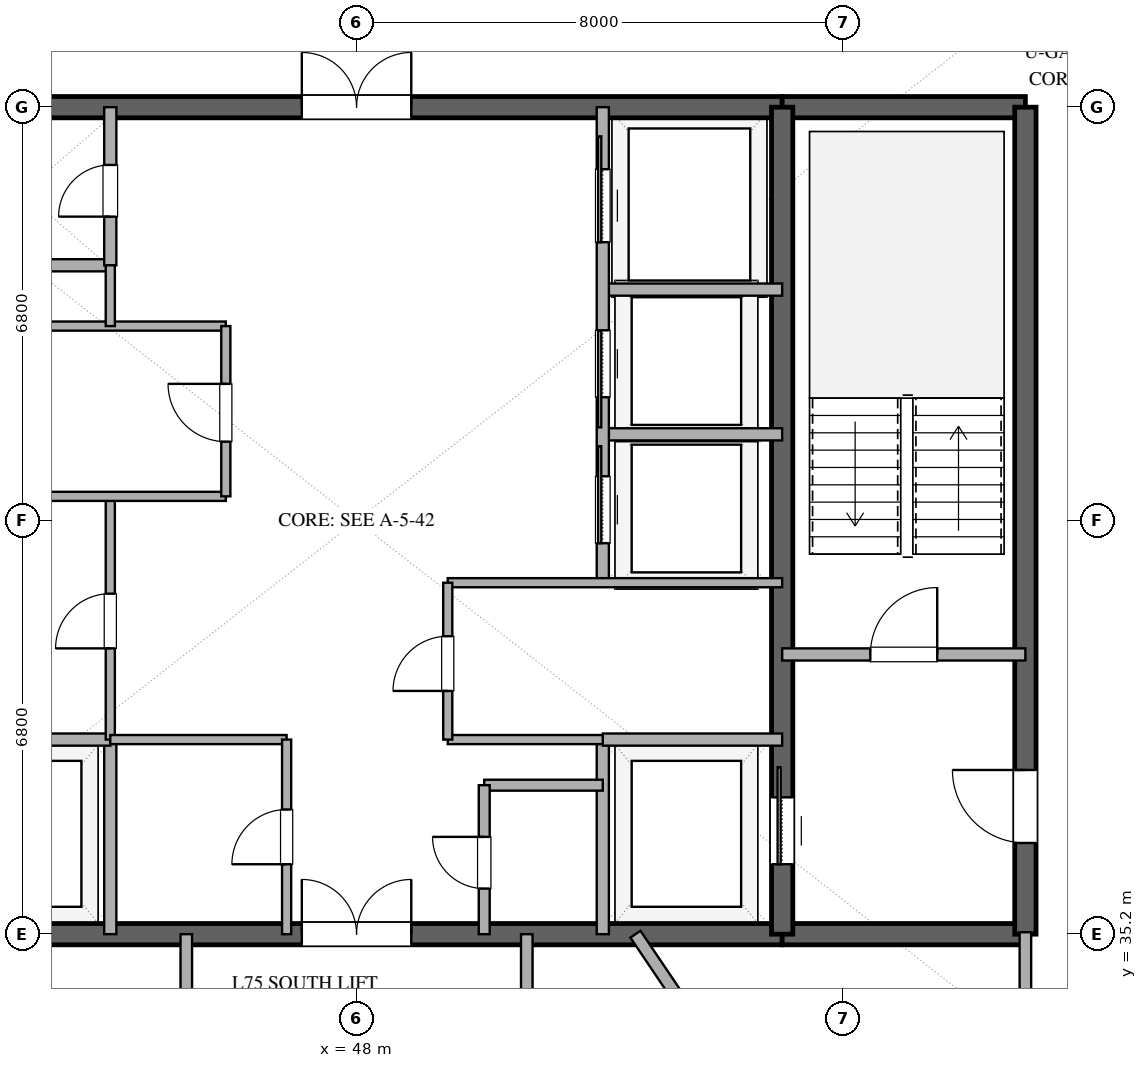
"""IFC4 building model, lengths in metres.
Left out: names, types, materials, properties, quantities, classifications, styles, units other than length and angle.
Written with IfcOpenShell. Run it as: python <this file> out.ifc"""

import sys

from ifc_helpers import new_model, si_unit, direction, frame, frame_2d, origin, place, context, subcontext, project, spatial, rectangle, extrude, element, fill, save


model = new_model("IFC4")
c1 = context("Model", 3, precision=1e-05, world=origin(), true_north=direction((0.0, 1.0)))
c2 = subcontext(c1, "Body", "Model", "MODEL_VIEW")
j1 = project(units=[si_unit("LENGTHUNIT", "METRE"), si_unit("PLANEANGLEUNIT", "RADIAN")], contexts=[c1])
p1 = place(None, origin())
s1 = spatial("IfcSite", under=j1, at=p1, CompositionType="ELEMENT")
p2 = place(p1, origin())
s2 = spatial("IfcBuilding", under=s1, at=p2, CompositionType="ELEMENT")
p3 = place(p2, frame((0.0, 0.0, 291.0)))
s3 = spatial("IfcBuildingStorey", under=s2, at=p3, CompositionType="ELEMENT", Elevation=291.0)
p4 = place(p3, frame((41.0, 35.2, 0.0), z_axis=(0.0, 0.0, 1.0), x_axis=(1.0, 0.0, 0.0)))
e1 = element("IfcWall", 1, at=p4, inside=s3, PredefinedType="SHEAR", context=c2, shape_type="SweptSolid", body=[
    extrude(rectangle(XDim=14.0, YDim=0.35, at=frame_2d((7.0, 0.0))), origin(), (0.0, 0.0, 1.0), 3.37),
])
p5 = place(p4, frame((6.1, 0.0, 0.0)))
e2 = element("IfcOpeningElement", 2, at=p5, cuts=e1, PredefinedType="OPENING", context=c2, shape_type="SweptSolid", body=[
    extrude(rectangle(XDim=1.8, YDim=2.25, at=frame_2d((0.9, 1.125))), frame((0.0, 0.185, 0.0), z_axis=(0.0, -1.0, 0.0), x_axis=(1.0, 0.0, 0.0)), (0.0, 0.0, 1.0), 0.37),
])
p6 = place(p3, frame((55.0, 35.2, 0.0), z_axis=(0.0, 0.0, 1.0), x_axis=(1.0, 0.0, 0.0)))
e3 = element("IfcWall", 3, at=p6, inside=s3, PredefinedType="SHEAR", context=c2, shape_type="SweptSolid", body=[
    extrude(rectangle(XDim=4.0, YDim=0.35, at=frame_2d((2.0, 0.0))), origin(), (0.0, 0.0, 1.0), 3.37),
])
p7 = place(p3, frame((41.0, 48.8, 0.0), z_axis=(0.0, 0.0, 1.0), x_axis=(1.0, 0.0, 0.0)))
e4 = element("IfcWall", 4, at=p7, inside=s3, PredefinedType="SHEAR", context=c2, shape_type="SweptSolid", body=[
    extrude(rectangle(XDim=14.0, YDim=0.35, at=frame_2d((7.0, 0.0))), origin(), (0.0, 0.0, 1.0), 3.37),
])
p8 = place(p7, frame((6.1, 0.0, 0.0)))
e5 = element("IfcOpeningElement", 5, at=p8, cuts=e4, PredefinedType="OPENING", context=c2, shape_type="SweptSolid", body=[
    extrude(rectangle(XDim=1.8, YDim=2.25, at=frame_2d((0.9, 1.125))), frame((0.0, 0.185, 0.0), z_axis=(0.0, -1.0, 0.0), x_axis=(1.0, 0.0, 0.0)), (0.0, 0.0, 1.0), 0.37),
])
p9 = place(p3, frame((55.0, 48.8, 0.0), z_axis=(0.0, 0.0, 1.0), x_axis=(1.0, 0.0, 0.0)))
e6 = element("IfcWall", 6, at=p9, inside=s3, PredefinedType="SHEAR", context=c2, shape_type="SweptSolid", body=[
    extrude(rectangle(XDim=4.0, YDim=0.35, at=frame_2d((2.0, 0.0))), origin(), (0.0, 0.0, 1.0), 3.37),
])
p10 = place(p3, frame((59.0, 35.2, 0.0), z_axis=(0.0, 0.0, 1.0), x_axis=(0.0, 1.0, 0.0)))
e7 = element("IfcWall", 7, at=p10, inside=s3, PredefinedType="SHEAR", context=c2, shape_type="SweptSolid", body=[
    extrude(rectangle(XDim=13.6, YDim=0.35, at=frame_2d((6.8, 0.0))), origin(), (0.0, 0.0, 1.0), 3.37),
])
p11 = place(p10, frame((1.5, 0.0, 0.0)))
e8 = element("IfcOpeningElement", 8, at=p11, cuts=e7, PredefinedType="OPENING", context=c2, shape_type="SweptSolid", body=[
    extrude(rectangle(XDim=1.2, YDim=2.15, at=frame_2d((0.6, 1.075))), frame((0.0, 0.185, 0.0), z_axis=(0.0, -1.0, 0.0), x_axis=(1.0, 0.0, 0.0)), (0.0, 0.0, 1.0), 0.37),
])
p12 = place(p3, frame((55.0, 35.2, 0.0), z_axis=(0.0, 0.0, 1.0), x_axis=(0.0, 1.0, 0.0)))
e9 = element("IfcWall", 9, at=p12, inside=s3, PredefinedType="SHEAR", context=c2, shape_type="SweptSolid", body=[
    extrude(rectangle(XDim=13.6, YDim=0.35, at=frame_2d((6.8, 0.0))), origin(), (0.0, 0.0, 1.0), 3.37),
])
p13 = place(p12, frame((1.15, 0.0, 0.0)))
e10 = element("IfcOpeningElement", 10, at=p13, cuts=e9, PredefinedType="OPENING", context=c2, shape_type="SweptSolid", body=[
    extrude(rectangle(XDim=1.1, YDim=2.2, at=frame_2d((0.55, 1.1))), frame((0.0, 0.185, 0.0), z_axis=(0.0, -1.0, 0.0), x_axis=(1.0, 0.0, 0.0)), (0.0, 0.0, 1.0), 0.37),
])
p14 = place(p3, frame((55.0, 39.8, 0.0), z_axis=(0.0, 0.0, 1.0), x_axis=(1.0, 0.0, 0.0)))
e11 = element("IfcWall", 11, at=p14, inside=s3, PredefinedType="SOLIDWALL", context=c2, shape_type="SweptSolid", body=[
    extrude(rectangle(XDim=4.0, YDim=0.2, at=frame_2d((2.0, 0.0))), origin(), (0.0, 0.0, 1.0), 2.73),
])
p15 = place(p14, frame((1.45, 0.0, 0.0)))
e12 = element("IfcOpeningElement", 12, at=p15, cuts=e11, PredefinedType="OPENING", context=c2, shape_type="SweptSolid", body=[
    extrude(rectangle(XDim=1.1, YDim=2.15, at=frame_2d((0.55, 1.075))), frame((0.0, 0.11, 0.0), z_axis=(0.0, -1.0, 0.0), x_axis=(1.0, 0.0, 0.0)), (0.0, 0.0, 1.0), 0.22),
])
p16 = place(p3, frame((43.95, 35.2, 0.0), z_axis=(0.0, 0.0, 1.0), x_axis=(0.0, 1.0, 0.0)))
e13 = element("IfcWall", 13, at=p16, inside=s3, PredefinedType="SOLIDWALL", context=c2, shape_type="SweptSolid", body=[
    extrude(rectangle(XDim=3.2, YDim=0.2, at=frame_2d((1.6, 0.0))), origin(), (0.0, 0.0, 1.0), 2.73),
])
p17 = place(p3, frame((41.0, 38.4, 0.0), z_axis=(0.0, 0.0, 1.0), x_axis=(1.0, 0.0, 0.0)))
e14 = element("IfcWall", 14, at=p17, inside=s3, PredefinedType="SOLIDWALL", context=c2, shape_type="SweptSolid", body=[
    extrude(rectangle(XDim=2.95, YDim=0.2, at=frame_2d((1.475, 0.0))), origin(), (0.0, 0.0, 1.0), 2.73),
])
p18 = place(p3, frame((52.05, 35.2, 0.0), z_axis=(0.0, 0.0, 1.0), x_axis=(0.0, 1.0, 0.0)))
e15 = element("IfcWall", 15, at=p18, inside=s3, PredefinedType="SOLIDWALL", context=c2, shape_type="SweptSolid", body=[
    extrude(rectangle(XDim=3.2, YDim=0.2, at=frame_2d((1.6, 0.0))), origin(), (0.0, 0.0, 1.0), 2.73),
])
for number, where, z_axis, x_axis in (
    (16, (52.05, 38.4, 0.0), (0.0, 0.0, 1.0), (1.0, 0.0, 0.0)),
    (17, (41.0, 46.2, 0.0), (0.0, 0.0, 1.0), (1.0, 0.0, 0.0)),
):
    element("IfcWall", number, at=place(p3, frame(where, z_axis=z_axis, x_axis=x_axis)), inside=s3, PredefinedType="SOLIDWALL", context=c2, shape_type="SweptSolid", body=[
        extrude(rectangle(XDim=2.95, YDim=0.2, at=frame_2d((1.475, 0.0))), origin(), (0.0, 0.0, 1.0), 2.73),
    ])
p19 = place(p3, frame((43.95, 46.2, 0.0), z_axis=(0.0, 0.0, 1.0), x_axis=(0.0, 1.0, 0.0)))
e18 = element("IfcWall", 18, at=p19, inside=s3, PredefinedType="SOLIDWALL", context=c2, shape_type="SweptSolid", body=[
    extrude(rectangle(XDim=2.6, YDim=0.2, at=frame_2d((1.3, 0.0))), origin(), (0.0, 0.0, 1.0), 2.73),
])
p20 = place(p19, frame((0.8, 0.0, 0.0)))
e19 = element("IfcOpeningElement", 19, at=p20, cuts=e18, PredefinedType="OPENING", context=c2, shape_type="SweptSolid", body=[
    extrude(rectangle(XDim=0.85, YDim=2.15, at=frame_2d((0.425, 1.075))), frame((0.0, 0.11, 0.0), z_axis=(0.0, -1.0, 0.0), x_axis=(1.0, 0.0, 0.0)), (0.0, 0.0, 1.0), 0.22),
])
p21 = place(p3, frame((43.95, 38.4, 0.0), z_axis=(0.0, 0.0, 1.0), x_axis=(0.0, 1.0, 0.0)))
e20 = element("IfcWall", 20, at=p21, inside=s3, PredefinedType="PARTITIONING", context=c2, shape_type="SweptSolid", body=[
    extrude(rectangle(XDim=4.0, YDim=0.15, at=frame_2d((2.0, 0.0))), origin(), (0.0, 0.0, 1.0), 2.73),
])
p22 = place(p21, frame((1.5, 0.0, 0.0)))
e21 = element("IfcOpeningElement", 21, at=p22, cuts=e20, PredefinedType="OPENING", context=c2, shape_type="SweptSolid", body=[
    extrude(rectangle(XDim=0.9, YDim=2.15, at=frame_2d((0.45, 1.075))), frame((0.0, 0.085, 0.0), z_axis=(0.0, -1.0, 0.0), x_axis=(1.0, 0.0, 0.0)), (0.0, 0.0, 1.0), 0.17),
])
for number, where, z_axis, x_axis in (
    (22, (41.0, 42.4, 0.0), (0.0, 0.0, 1.0), (1.0, 0.0, 0.0)),
    (23, (41.0, 45.2, 0.0), (0.0, 0.0, 1.0), (1.0, 0.0, 0.0)),
):
    element("IfcWall", number, at=place(p3, frame(where, z_axis=z_axis, x_axis=x_axis)), inside=s3, PredefinedType="PARTITIONING", context=c2, shape_type="SweptSolid", body=[
        extrude(rectangle(XDim=4.85, YDim=0.15, at=frame_2d((2.425, 0.0))), origin(), (0.0, 0.0, 1.0), 2.73),
    ])
p23 = place(p3, frame((43.95, 45.2, 0.0), z_axis=(0.0, 0.0, 1.0), x_axis=(0.0, 1.0, 0.0)))
e24 = element("IfcWall", 24, at=p23, inside=s3, PredefinedType="PARTITIONING", context=c2, shape_type="SweptSolid", body=[
    extrude(rectangle(XDim=1.0, YDim=0.15, at=frame_2d((0.5, 0.0))), origin(), (0.0, 0.0, 1.0), 2.73),
])
p24 = place(p3, frame((45.85, 42.4, 0.0), z_axis=(0.0, 0.0, 1.0), x_axis=(0.0, 1.0, 0.0)))
e25 = element("IfcWall", 25, at=p24, inside=s3, PredefinedType="PARTITIONING", context=c2, shape_type="SweptSolid", body=[
    extrude(rectangle(XDim=2.8, YDim=0.15, at=frame_2d((1.4, 0.0))), origin(), (0.0, 0.0, 1.0), 2.73),
])
p25 = place(p24, frame((0.9, 0.0, 0.0)))
e26 = element("IfcOpeningElement", 26, at=p25, cuts=e25, PredefinedType="OPENING", context=c2, shape_type="SweptSolid", body=[
    extrude(rectangle(XDim=0.95, YDim=2.15, at=frame_2d((0.475, 1.075))), frame((0.0, 0.085, 0.0), z_axis=(0.0, -1.0, 0.0), x_axis=(1.0, 0.0, 0.0)), (0.0, 0.0, 1.0), 0.17),
])
for number, where, z_axis, x_axis in (
    (27, (52.05, 43.42, 0.0), (0.0, 0.0, 1.0), (1.0, 0.0, 0.0)),
    (28, (52.05, 45.8, 0.0), (0.0, 0.0, 1.0), (1.0, 0.0, 0.0)),
):
    element("IfcWall", number, at=place(p3, frame(where, z_axis=z_axis, x_axis=x_axis)), inside=s3, PredefinedType="SOLIDWALL", context=c2, shape_type="SweptSolid", body=[
        extrude(rectangle(XDim=2.95, YDim=0.2, at=frame_2d((1.475, 0.0))), origin(), (0.0, 0.0, 1.0), 2.73),
    ])
p26 = place(p3, frame((52.05, 40.98, 0.0), z_axis=(0.0, 0.0, 1.0), x_axis=(0.0, 1.0, 0.0)))
e29 = element("IfcWall", 29, at=p26, inside=s3, PredefinedType="SOLIDWALL", context=c2, shape_type="SweptSolid", body=[
    extrude(rectangle(XDim=7.82, YDim=0.2, at=frame_2d((3.91, 0.0))), origin(), (0.0, 0.0, 1.0), 2.73),
])
p27 = place(p26, frame((0.65, 0.0, 0.0)))
e30 = element("IfcOpeningElement", 30, at=p27, cuts=e29, PredefinedType="OPENING", context=c2, shape_type="SweptSolid", body=[
    extrude(rectangle(XDim=1.1, YDim=2.2, at=frame_2d((0.55, 1.1))), frame((0.0, 0.11, 0.0), z_axis=(0.0, -1.0, 0.0), x_axis=(1.0, 0.0, 0.0)), (0.0, 0.0, 1.0), 0.22),
])
p28 = place(p26, frame((3.05, 0.0, 0.0)))
e31 = element("IfcOpeningElement", 31, at=p28, cuts=e29, PredefinedType="OPENING", context=c2, shape_type="SweptSolid", body=[
    extrude(rectangle(XDim=1.1, YDim=2.2, at=frame_2d((0.55, 1.1))), frame((0.0, 0.11, 0.0), z_axis=(0.0, -1.0, 0.0), x_axis=(1.0, 0.0, 0.0)), (0.0, 0.0, 1.0), 0.22),
])
p29 = place(p26, frame((5.6, 0.0, 0.0)))
e32 = element("IfcOpeningElement", 32, at=p29, cuts=e29, PredefinedType="OPENING", context=c2, shape_type="SweptSolid", body=[
    extrude(rectangle(XDim=1.2, YDim=2.2, at=frame_2d((0.6, 1.1))), frame((0.0, 0.11, 0.0), z_axis=(0.0, -1.0, 0.0), x_axis=(1.0, 0.0, 0.0)), (0.0, 0.0, 1.0), 0.22),
])
p30 = place(p3, frame((49.5, 40.98, 0.0), z_axis=(0.0, 0.0, 1.0), x_axis=(1.0, 0.0, 0.0)))
e33 = element("IfcWall", 33, at=p30, inside=s3, PredefinedType="PARTITIONING", context=c2, shape_type="SweptSolid", body=[
    extrude(rectangle(XDim=5.5, YDim=0.15, at=frame_2d((2.75, 0.0))), origin(), (0.0, 0.0, 1.0), 2.73),
])
p31 = place(p3, frame((49.5, 38.4, 0.0), z_axis=(0.0, 0.0, 1.0), x_axis=(1.0, 0.0, 0.0)))
e34 = element("IfcWall", 34, at=p31, inside=s3, PredefinedType="PARTITIONING", context=c2, shape_type="SweptSolid", body=[
    extrude(rectangle(XDim=2.55, YDim=0.15, at=frame_2d((1.275, 0.0))), origin(), (0.0, 0.0, 1.0), 2.73),
])
p32 = place(p3, frame((49.5, 38.4, 0.0), z_axis=(0.0, 0.0, 1.0), x_axis=(0.0, 1.0, 0.0)))
e35 = element("IfcWall", 35, at=p32, inside=s3, PredefinedType="PARTITIONING", context=c2, shape_type="SweptSolid", body=[
    extrude(rectangle(XDim=2.58, YDim=0.15, at=frame_2d((1.29, 0.0))), origin(), (0.0, 0.0, 1.0), 2.73),
])
p33 = place(p32, frame((0.8, 0.0, 0.0)))
e36 = element("IfcOpeningElement", 36, at=p33, cuts=e35, PredefinedType="OPENING", context=c2, shape_type="SweptSolid", body=[
    extrude(rectangle(XDim=0.9, YDim=2.15, at=frame_2d((0.45, 1.075))), frame((0.0, 0.085, 0.0), z_axis=(0.0, -1.0, 0.0), x_axis=(1.0, 0.0, 0.0)), (0.0, 0.0, 1.0), 0.17),
])
p34 = place(p3, frame((43.95, 38.4, 0.0), z_axis=(0.0, 0.0, 1.0), x_axis=(1.0, 0.0, 0.0)))
e37 = element("IfcWall", 37, at=p34, inside=s3, PredefinedType="PARTITIONING", context=c2, shape_type="SweptSolid", body=[
    extrude(rectangle(XDim=2.9, YDim=0.15, at=frame_2d((1.45, 0.0))), origin(), (0.0, 0.0, 1.0), 2.73),
])
p35 = place(p3, frame((46.85, 35.2, 0.0), z_axis=(0.0, 0.0, 1.0), x_axis=(0.0, 1.0, 0.0)))
e38 = element("IfcWall", 38, at=p35, inside=s3, PredefinedType="PARTITIONING", context=c2, shape_type="SweptSolid", body=[
    extrude(rectangle(XDim=3.2, YDim=0.15, at=frame_2d((1.6, 0.0))), origin(), (0.0, 0.0, 1.0), 2.73),
])
p36 = place(p35, frame((1.15, 0.0, 0.0)))
e39 = element("IfcOpeningElement", 39, at=p36, cuts=e38, PredefinedType="OPENING", context=c2, shape_type="SweptSolid", body=[
    extrude(rectangle(XDim=0.9, YDim=2.15, at=frame_2d((0.45, 1.075))), frame((0.0, 0.085, 0.0), z_axis=(0.0, -1.0, 0.0), x_axis=(1.0, 0.0, 0.0)), (0.0, 0.0, 1.0), 0.17),
])
p37 = place(p3, frame((50.1, 37.65, 0.0), z_axis=(0.0, 0.0, 1.0), x_axis=(1.0, 0.0, 0.0)))
e40 = element("IfcWall", 40, at=p37, inside=s3, PredefinedType="PLUMBINGWALL", context=c2, shape_type="SweptSolid", body=[
    extrude(rectangle(XDim=1.95, YDim=0.18, at=frame_2d((0.975, 0.0))), origin(), (0.0, 0.0, 1.0), 2.73),
])
p38 = place(p3, frame((50.1, 35.2, 0.0), z_axis=(0.0, 0.0, 1.0), x_axis=(0.0, 1.0, 0.0)))
e41 = element("IfcWall", 41, at=p38, inside=s3, PredefinedType="PLUMBINGWALL", context=c2, shape_type="SweptSolid", body=[
    extrude(rectangle(XDim=2.45, YDim=0.18, at=frame_2d((1.225, 0.0))), origin(), (0.0, 0.0, 1.0), 2.73),
])
p39 = place(p38, frame((0.75, 0.0, 0.0)))
e42 = element("IfcOpeningElement", 42, at=p39, cuts=e41, PredefinedType="OPENING", context=c2, shape_type="SweptSolid", body=[
    extrude(rectangle(XDim=0.85, YDim=2.1, at=frame_2d((0.425, 1.05))), frame((0.0, 0.1, 0.0), z_axis=(0.0, -1.0, 0.0), x_axis=(1.0, 0.0, 0.0)), (0.0, 0.0, 1.0), 0.2),
])
p40 = place(p3, frame((54.97, 31.667, 0.0), z_axis=(0.0, 0.0, 1.0), x_axis=(-0.559200276542, 0.829032599308, 0.0)))
e43 = element("IfcWall", 43, at=p40, inside=s3, PredefinedType="PARTITIONING", context=c2, shape_type="SweptSolid", body=[
    extrude(rectangle(XDim=4.261, YDim=0.2, at=frame_2d((2.131, 0.0))), origin(), (0.0, 0.0, 1.0), 2.73),
])
for number, where, z_axis, x_axis in (
    (44, (50.8, 35.2, 0.0), (0.0, 0.0, 1.0), (0.0, -1.0, 0.0)),
    (45, (45.2, 33.1, 0.0), (0.0, 0.0, 1.0), (0.0, 1.0, 0.0)),
):
    element("IfcWall", number, at=place(p3, frame(where, z_axis=z_axis, x_axis=x_axis)), inside=s3, PredefinedType="PARTITIONING", context=c2, shape_type="SweptSolid", body=[
        extrude(rectangle(XDim=2.1, YDim=0.19, at=frame_2d((1.05, 0.0))), origin(), (0.0, 0.0, 1.0), 2.73),
    ])
p41 = place(p3, frame((59.0, 34.0, 0.0), z_axis=(0.0, 0.0, 1.0), x_axis=(0.0, 1.0, 0.0)))
e46 = element("IfcWall", 46, at=p41, inside=s3, PredefinedType="PARTITIONING", context=c2, shape_type="SweptSolid", body=[
    extrude(rectangle(XDim=1.232, YDim=0.19, at=frame_2d((0.616, 0.0))), origin(), (0.0, 0.0, 1.0), 2.73),
])
p42 = place(p13, origin())
e47 = element("IfcDoor", 47, at=p42, inside=s3, OperationType="SLIDING_TO_RIGHT", PredefinedType="DOOR", context=c2, shape_type="SweptSolid", body=[
    extrude(rectangle(XDim=1.1, YDim=2.2, at=frame_2d((0.55, 1.1))), frame((0.0, 0.025, 0.0), z_axis=(0.0, -1.0, 0.0), x_axis=(1.0, 0.0, 0.0)), (0.0, 0.0, 1.0), 0.05),
])
fill(e10, e47)
p43 = place(p11, origin())
e48 = element("IfcDoor", 48, at=p43, inside=s3, OperationType="SINGLE_SWING_RIGHT", PredefinedType="DOOR", context=c2, shape_type="SweptSolid", body=[
    extrude(rectangle(XDim=1.2, YDim=2.15, at=frame_2d((0.6, 1.075))), frame((0.0, 0.025, 0.0), z_axis=(0.0, -1.0, 0.0), x_axis=(1.0, 0.0, 0.0)), (0.0, 0.0, 1.0), 0.05),
])
fill(e8, e48)
p44 = place(p5, origin())
e49 = element("IfcDoor", 49, at=p44, inside=s3, OperationType="DOUBLE_DOOR_SINGLE_SWING", PredefinedType="DOOR", context=c2, shape_type="SweptSolid", body=[
    extrude(rectangle(XDim=1.8, YDim=2.25, at=frame_2d((0.9, 1.125))), frame((0.0, 0.025, 0.0), z_axis=(0.0, -1.0, 0.0), x_axis=(1.0, 0.0, 0.0)), (0.0, 0.0, 1.0), 0.05),
])
fill(e2, e49)
p45 = place(p8, origin())
e50 = element("IfcDoor", 50, at=p45, inside=s3, OperationType="DOUBLE_DOOR_SINGLE_SWING", PredefinedType="DOOR", context=c2, shape_type="SweptSolid", body=[
    extrude(rectangle(XDim=1.8, YDim=2.25, at=frame_2d((0.9, 1.125))), frame((0.0, 0.025, 0.0), z_axis=(0.0, -1.0, 0.0), x_axis=(1.0, 0.0, 0.0)), (0.0, 0.0, 1.0), 0.05),
])
fill(e5, e50)
p46 = place(p15, origin())
e51 = element("IfcDoor", 51, at=p46, inside=s3, OperationType="SINGLE_SWING_RIGHT", PredefinedType="DOOR", context=c2, shape_type="SweptSolid", body=[
    extrude(rectangle(XDim=1.1, YDim=2.15, at=frame_2d((0.55, 1.075))), frame((0.0, 0.025, 0.0), z_axis=(0.0, -1.0, 0.0), x_axis=(1.0, 0.0, 0.0)), (0.0, 0.0, 1.0), 0.05),
])
fill(e12, e51)
p47 = place(p20, origin())
e52 = element("IfcDoor", 52, at=p47, inside=s3, OperationType="SINGLE_SWING_LEFT", PredefinedType="DOOR", context=c2, shape_type="SweptSolid", body=[
    extrude(rectangle(XDim=0.85, YDim=2.15, at=frame_2d((0.425, 1.075))), frame((0.0, 0.025, 0.0), z_axis=(0.0, -1.0, 0.0), x_axis=(1.0, 0.0, 0.0)), (0.0, 0.0, 1.0), 0.05),
])
fill(e19, e52)
p48 = place(p22, origin())
e53 = element("IfcDoor", 53, at=p48, inside=s3, OperationType="SINGLE_SWING_LEFT", PredefinedType="DOOR", context=c2, shape_type="SweptSolid", body=[
    extrude(rectangle(XDim=0.9, YDim=2.15, at=frame_2d((0.45, 1.075))), frame((0.0, 0.025, 0.0), z_axis=(0.0, -1.0, 0.0), x_axis=(1.0, 0.0, 0.0)), (0.0, 0.0, 1.0), 0.05),
])
fill(e21, e53)
p49 = place(p25, origin())
e54 = element("IfcDoor", 54, at=p49, inside=s3, OperationType="SINGLE_SWING_RIGHT", PredefinedType="DOOR", context=c2, shape_type="SweptSolid", body=[
    extrude(rectangle(XDim=0.95, YDim=2.15, at=frame_2d((0.475, 1.075))), frame((0.0, 0.025, 0.0), z_axis=(0.0, -1.0, 0.0), x_axis=(1.0, 0.0, 0.0)), (0.0, 0.0, 1.0), 0.05),
])
fill(e26, e54)
p50 = place(p27, origin())
e55 = element("IfcDoor", 55, at=p50, inside=s3, OperationType="SLIDING_TO_RIGHT", PredefinedType="DOOR", context=c2, shape_type="SweptSolid", body=[
    extrude(rectangle(XDim=1.1, YDim=2.2, at=frame_2d((0.55, 1.1))), frame((0.0, 0.025, 0.0), z_axis=(0.0, -1.0, 0.0), x_axis=(1.0, 0.0, 0.0)), (0.0, 0.0, 1.0), 0.05),
])
fill(e30, e55)
p51 = place(p28, origin())
e56 = element("IfcDoor", 56, at=p51, inside=s3, OperationType="SLIDING_TO_LEFT", PredefinedType="DOOR", context=c2, shape_type="SweptSolid", body=[
    extrude(rectangle(XDim=1.1, YDim=2.2, at=frame_2d((0.55, 1.1))), frame((0.0, 0.025, 0.0), z_axis=(0.0, -1.0, 0.0), x_axis=(1.0, 0.0, 0.0)), (0.0, 0.0, 1.0), 0.05),
])
fill(e31, e56)
p52 = place(p29, origin())
e57 = element("IfcDoor", 57, at=p52, inside=s3, OperationType="SLIDING_TO_RIGHT", PredefinedType="DOOR", context=c2, shape_type="SweptSolid", body=[
    extrude(rectangle(XDim=1.2, YDim=2.2, at=frame_2d((0.6, 1.1))), frame((0.0, 0.025, 0.0), z_axis=(0.0, -1.0, 0.0), x_axis=(1.0, 0.0, 0.0)), (0.0, 0.0, 1.0), 0.05),
])
fill(e32, e57)
p53 = place(p33, origin())
e58 = element("IfcDoor", 58, at=p53, inside=s3, OperationType="SINGLE_SWING_LEFT", PredefinedType="DOOR", context=c2, shape_type="SweptSolid", body=[
    extrude(rectangle(XDim=0.9, YDim=2.15, at=frame_2d((0.45, 1.075))), frame((0.0, 0.025, 0.0), z_axis=(0.0, -1.0, 0.0), x_axis=(1.0, 0.0, 0.0)), (0.0, 0.0, 1.0), 0.05),
])
fill(e36, e58)
p54 = place(p36, origin())
e59 = element("IfcDoor", 59, at=p54, inside=s3, OperationType="SINGLE_SWING_LEFT", PredefinedType="DOOR", context=c2, shape_type="SweptSolid", body=[
    extrude(rectangle(XDim=0.9, YDim=2.15, at=frame_2d((0.45, 1.075))), frame((0.0, 0.025, 0.0), z_axis=(0.0, -1.0, 0.0), x_axis=(1.0, 0.0, 0.0)), (0.0, 0.0, 1.0), 0.05),
])
fill(e39, e59)
p55 = place(p39, origin())
e60 = element("IfcDoor", 60, at=p55, inside=s3, OperationType="SINGLE_SWING_RIGHT", PredefinedType="DOOR", context=c2, shape_type="SweptSolid", body=[
    extrude(rectangle(XDim=0.85, YDim=2.1, at=frame_2d((0.425, 1.05))), frame((0.0, 0.025, 0.0), z_axis=(0.0, -1.0, 0.0), x_axis=(1.0, 0.0, 0.0)), (0.0, 0.0, 1.0), 0.05),
])
fill(e42, e60)
save(model, sys.argv[1])
